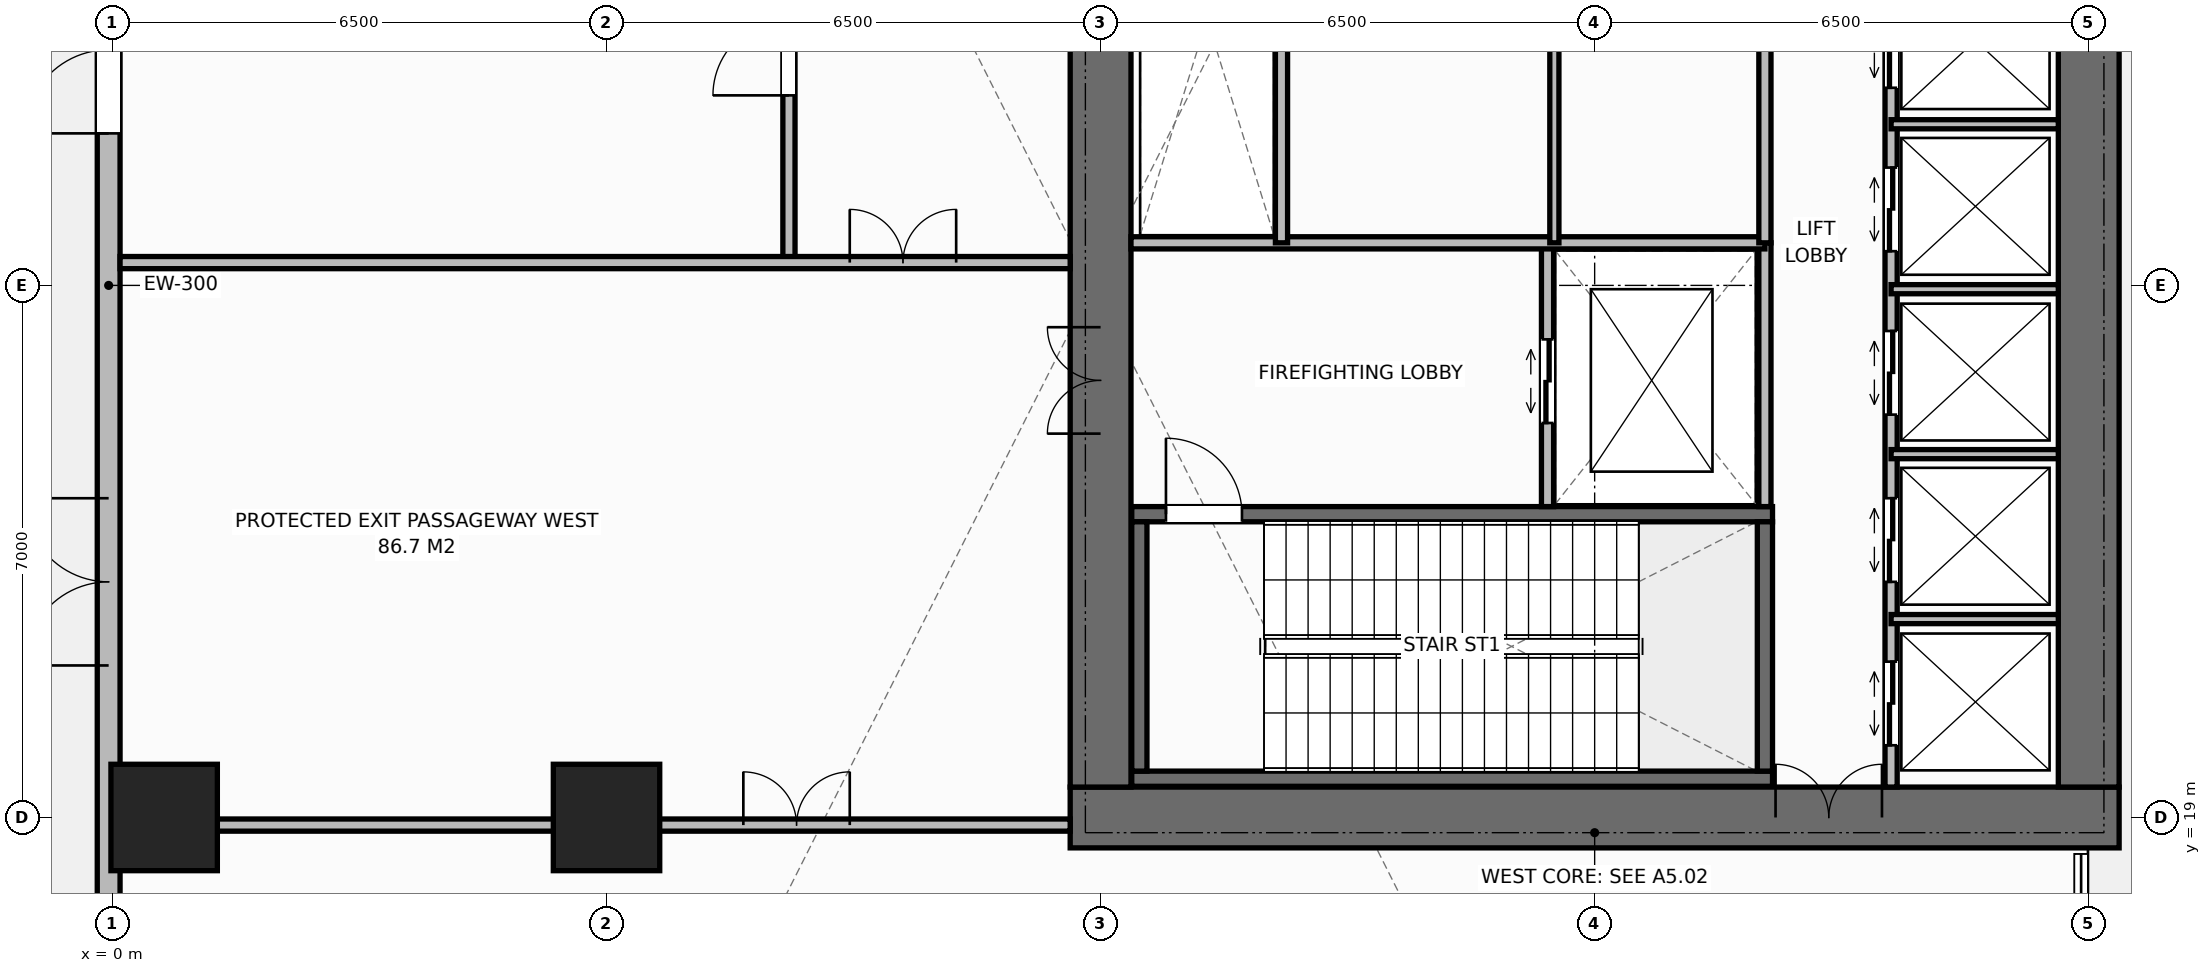
"""IFC4 building model, lengths in metres.
Left out: names, types, materials, properties, quantities, classifications, styles, units other than length and angle.
Written with IfcOpenShell. Run it as: python <this file> out.ifc"""

import sys

from ifc_helpers import new_model, si_unit, direction, frame, frame_2d, origin, origin_2d, place, context, subcontext, project, spatial, rectangle, extrude, element, fill, save


model = new_model("IFC4")
c1 = context("Model", 3, precision=1e-05, world=origin(), true_north=direction((0.0, 1.0)))
c2 = subcontext(c1, "Body", "Model", "MODEL_VIEW")
j1 = project(units=[si_unit("LENGTHUNIT", "METRE"), si_unit("PLANEANGLEUNIT", "RADIAN")], contexts=[c1])
p1 = place(None, origin())
s1 = spatial("IfcSite", under=j1, at=p1, CompositionType="ELEMENT")
p2 = place(p1, origin())
s2 = spatial("IfcBuilding", under=s1, at=p2, CompositionType="ELEMENT")
p3 = place(p2, origin())
s3 = spatial("IfcBuildingStorey", under=s2, at=p3, CompositionType="ELEMENT", Elevation=0.0)
p4 = place(p3, frame((12.6, 19.0, 0.0), z_axis=(0.0, 0.0, 1.0), x_axis=(1.0, 0.0, 0.0)))
e1 = element("IfcWall", 1, at=p4, inside=s3, PredefinedType="SHEAR", context=c2, shape_type="SweptSolid", body=[
    extrude(rectangle(XDim=13.8, YDim=0.8, at=frame_2d((6.9, 0.0))), origin(), (0.0, 0.0, 1.0), 6.0),
])
p5 = place(p4, frame((9.28, 0.0, 0.0)))
e2 = element("IfcOpeningElement", 2, at=p5, cuts=e1, PredefinedType="OPENING", context=c2, shape_type="SweptSolid", body=[
    extrude(rectangle(XDim=1.4, YDim=2.2, at=frame_2d((0.7, 1.1))), frame((0.0, 0.41, 0.0), z_axis=(0.0, -1.0, 0.0), x_axis=(1.0, 0.0, 0.0)), (0.0, 0.0, 1.0), 0.82),
])
p6 = place(p3, frame((13.0, 19.4, 0.0), z_axis=(0.0, 0.0, 1.0), x_axis=(0.0, 1.0, 0.0)))
e3 = element("IfcWall", 3, at=p6, inside=s3, PredefinedType="SHEAR", context=c2, shape_type="SweptSolid", body=[
    extrude(rectangle(XDim=13.2, YDim=0.8, at=frame_2d((6.6, 0.0))), origin(), (0.0, 0.0, 1.0), 6.0),
])
p7 = place(p6, frame((4.65, 0.0, 0.0)))
e4 = element("IfcOpeningElement", 4, at=p7, cuts=e3, PredefinedType="OPENING", context=c2, shape_type="SweptSolid", body=[
    extrude(rectangle(XDim=1.4, YDim=2.2, at=frame_2d((0.7, 1.1))), frame((0.0, 0.41, 0.0), z_axis=(0.0, -1.0, 0.0), x_axis=(1.0, 0.0, 0.0)), (0.0, 0.0, 1.0), 0.82),
])
p8 = place(p3, frame((26.0, 19.4, 0.0), z_axis=(0.0, 0.0, 1.0), x_axis=(0.0, 1.0, 0.0)))
e5 = element("IfcWall", 5, at=p8, inside=s3, PredefinedType="SHEAR", context=c2, shape_type="SweptSolid", body=[
    extrude(rectangle(XDim=13.2, YDim=0.8, at=frame_2d((6.6, 0.0))), origin(), (0.0, 0.0, 1.0), 6.0),
])
p9 = place(p3, frame((13.41, 19.51, 0.0), z_axis=(0.0, 0.0, 1.0), x_axis=(1.0, 0.0, 0.0)))
e6 = element("IfcWall", 6, at=p9, inside=s3, PredefinedType="SHEAR", context=c2, shape_type="SweptSolid", body=[
    extrude(rectangle(XDim=8.43, YDim=0.2, at=frame_2d((4.215, 0.0))), origin(), (0.0, 0.0, 1.0), 6.0),
])
p10 = place(p3, frame((13.41, 22.99, 0.0), z_axis=(0.0, 0.0, 1.0), x_axis=(1.0, 0.0, 0.0)))
e7 = element("IfcWall", 7, at=p10, inside=s3, PredefinedType="SHEAR", context=c2, shape_type="SweptSolid", body=[
    extrude(rectangle(XDim=8.43, YDim=0.2, at=frame_2d((4.215, 0.0))), origin(), (0.0, 0.0, 1.0), 6.0),
])
p11 = place(p10, frame((0.45, 0.0, 0.0)))
e8 = element("IfcOpeningElement", 8, at=p11, cuts=e7, PredefinedType="OPENING", context=c2, shape_type="SweptSolid", body=[
    extrude(rectangle(XDim=1.0, YDim=2.15, at=frame_2d((0.5, 1.075))), frame((0.0, 0.11, 0.0), z_axis=(0.0, -1.0, 0.0), x_axis=(1.0, 0.0, 0.0)), (0.0, 0.0, 1.0), 0.22),
])
for number, where, z_axis, x_axis in (
    (9, (13.51, 19.61, 0.0), (0.0, 0.0, 1.0), (0.0, 1.0, 0.0)),
    (10, (21.74, 19.61, 0.0), (0.0, 0.0, 1.0), (0.0, 1.0, 0.0)),
):
    element("IfcWall", number, at=place(p3, frame(where, z_axis=z_axis, x_axis=x_axis)), inside=s3, PredefinedType="SHEAR", context=c2, shape_type="SweptSolid", body=[
        extrude(rectangle(XDim=3.28, YDim=0.2, at=frame_2d((1.64, 0.0))), origin(), (0.0, 0.0, 1.0), 6.0),
    ])
for number, where, z_axis, x_axis in (
    (11, (6.5, 19.0, 0.0), (0.0, 0.0, 1.0), (1.0, 0.0, 0.0)),
    (12, (0.68, 19.0, 0.0), (0.0, 0.0, 1.0), (1.0, 0.0, 0.0)),
):
    element("IfcColumn", number, at=place(p3, frame(where, z_axis=z_axis, x_axis=x_axis)), inside=s3, PredefinedType="COLUMN", context=c2, shape_type="SweptSolid", body=[
        extrude(rectangle(XDim=1.4, YDim=1.4, at=origin_2d()), origin(), (0.0, 0.0, 1.0), 6.0),
    ])
p12 = place(p3, frame((-0.05, 3.2, 0.0), z_axis=(0.0, 0.0, 1.0), x_axis=(0.0, 1.0, 0.0)))
e13 = element("IfcWall", 13, at=p12, inside=s3, PredefinedType="STANDARD", context=c2, shape_type="SweptSolid", body=[
    extrude(rectangle(XDim=45.6, YDim=0.3, at=frame_2d((22.8, 0.0))), origin(), (0.0, 0.0, 1.0), 5.72),
])
p13 = place(p12, frame((17.8, 0.0, 0.0)))
e14 = element("IfcOpeningElement", 14, at=p13, cuts=e13, PredefinedType="OPENING", context=c2, shape_type="SweptSolid", body=[
    extrude(rectangle(XDim=2.2, YDim=2.4, at=frame_2d((1.1, 1.2))), frame((0.0, 0.16, 0.0), z_axis=(0.0, -1.0, 0.0), x_axis=(1.0, 0.0, 0.0)), (0.0, 0.0, 1.0), 0.32),
])
p14 = place(p12, frame((24.8, 0.0, 0.0)))
e15 = element("IfcOpeningElement", 15, at=p14, cuts=e13, PredefinedType="OPENING", context=c2, shape_type="SweptSolid", body=[
    extrude(rectangle(XDim=1.1, YDim=2.2, at=frame_2d((0.55, 1.1))), frame((0.0, 0.16, 0.0), z_axis=(0.0, -1.0, 0.0), x_axis=(1.0, 0.0, 0.0)), (0.0, 0.0, 1.0), 0.32),
])
p15 = place(p12, frame((4.3, 0.0, 0.9)))
e16 = element("IfcOpeningElement", 16, at=p15, cuts=e13, PredefinedType="OPENING", context=c2, shape_type="SweptSolid", body=[
    extrude(rectangle(XDim=1.8, YDim=2.2, at=frame_2d((0.9, 1.1))), frame((0.0, 0.16, 0.0), z_axis=(0.0, -1.0, 0.0), x_axis=(1.0, 0.0, 0.0)), (0.0, 0.0, 1.0), 0.32),
])
p16 = place(p12, frame((11.3, 0.0, 0.9)))
e17 = element("IfcOpeningElement", 17, at=p16, cuts=e13, PredefinedType="OPENING", context=c2, shape_type="SweptSolid", body=[
    extrude(rectangle(XDim=1.8, YDim=2.2, at=frame_2d((0.9, 1.1))), frame((0.0, 0.16, 0.0), z_axis=(0.0, -1.0, 0.0), x_axis=(1.0, 0.0, 0.0)), (0.0, 0.0, 1.0), 0.32),
])
p17 = place(p12, frame((33.0, 0.0, 0.9)))
e18 = element("IfcOpeningElement", 18, at=p17, cuts=e13, PredefinedType="OPENING", context=c2, shape_type="SweptSolid", body=[
    extrude(rectangle(XDim=1.8, YDim=2.2, at=frame_2d((0.9, 1.1))), frame((0.0, 0.16, 0.0), z_axis=(0.0, -1.0, 0.0), x_axis=(1.0, 0.0, 0.0)), (0.0, 0.0, 1.0), 0.32),
])
p18 = place(p12, frame((39.3, 0.0, 0.9)))
e19 = element("IfcOpeningElement", 19, at=p18, cuts=e13, PredefinedType="OPENING", context=c2, shape_type="SweptSolid", body=[
    extrude(rectangle(XDim=1.8, YDim=2.2, at=frame_2d((0.9, 1.1))), frame((0.0, 0.16, 0.0), z_axis=(0.0, -1.0, 0.0), x_axis=(1.0, 0.0, 0.0)), (0.0, 0.0, 1.0), 0.32),
])
p19 = place(p3, frame((21.74, 23.09, 0.0), z_axis=(0.0, 0.0, 1.0), x_axis=(0.0, 1.0, 0.0)))
e20 = element("IfcWall", 20, at=p19, inside=s3, PredefinedType="STANDARD", context=c2, shape_type="SweptSolid", body=[
    extrude(rectangle(XDim=3.47, YDim=0.16, at=frame_2d((1.735, 0.0))), origin(), (0.0, 0.0, 1.0), 5.72),
])
p20 = place(p3, frame((18.88, 23.09, 0.0), z_axis=(0.0, 0.0, 1.0), x_axis=(0.0, 1.0, 0.0)))
e21 = element("IfcWall", 21, at=p20, inside=s3, PredefinedType="STANDARD", context=c2, shape_type="SweptSolid", body=[
    extrude(rectangle(XDim=3.47, YDim=0.16, at=frame_2d((1.735, 0.0))), origin(), (0.0, 0.0, 1.0), 5.72),
])
p21 = place(p20, frame((1.1, 0.0, 0.0)))
e22 = element("IfcOpeningElement", 22, at=p21, cuts=e21, PredefinedType="OPENING", context=c2, shape_type="SweptSolid", body=[
    extrude(rectangle(XDim=1.1, YDim=2.2, at=frame_2d((0.55, 1.1))), frame((0.0, 0.09, 0.0), z_axis=(0.0, -1.0, 0.0), x_axis=(1.0, 0.0, 0.0)), (0.0, 0.0, 1.0), 0.18),
])
p22 = place(p3, frame((13.4, 26.56, 0.0), z_axis=(0.0, 0.0, 1.0), x_axis=(1.0, 0.0, 0.0)))
e23 = element("IfcWall", 23, at=p22, inside=s3, PredefinedType="STANDARD", context=c2, shape_type="SweptSolid", body=[
    extrude(rectangle(XDim=8.34, YDim=0.16, at=frame_2d((4.17, 0.0))), origin(), (0.0, 0.0, 1.0), 5.72),
])
p23 = place(p3, frame((15.38, 26.56, 0.0), z_axis=(0.0, 0.0, 1.0), x_axis=(0.0, 1.0, 0.0)))
e24 = element("IfcWall", 24, at=p23, inside=s3, PredefinedType="STANDARD", context=c2, shape_type="SweptSolid", body=[
    extrude(rectangle(XDim=6.04, YDim=0.16, at=frame_2d((3.02, 0.0))), origin(), (0.0, 0.0, 1.0), 5.72),
])
p24 = place(p3, frame((18.97, 26.56, 0.0), z_axis=(0.0, 0.0, 1.0), x_axis=(0.0, 1.0, 0.0)))
e25 = element("IfcWall", 25, at=p24, inside=s3, PredefinedType="PARTITIONING", context=c2, shape_type="SweptSolid", body=[
    extrude(rectangle(XDim=6.04, YDim=0.12, at=frame_2d((3.02, 0.0))), origin(), (0.0, 0.0, 1.0), 5.72),
])
p25 = place(p3, frame((21.74, 26.56, 0.0), z_axis=(0.0, 0.0, 1.0), x_axis=(0.0, 1.0, 0.0)))
e26 = element("IfcWall", 26, at=p25, inside=s3, PredefinedType="STANDARD", context=c2, shape_type="SweptSolid", body=[
    extrude(rectangle(XDim=6.04, YDim=0.16, at=frame_2d((3.02, 0.0))), origin(), (0.0, 0.0, 1.0), 5.72),
])
p26 = place(p3, frame((23.4, 19.4, 0.0), z_axis=(0.0, 0.0, 1.0), x_axis=(0.0, 1.0, 0.0)))
e27 = element("IfcWall", 27, at=p26, inside=s3, PredefinedType="STANDARD", context=c2, shape_type="SweptSolid", body=[
    extrude(rectangle(XDim=13.2, YDim=0.16, at=frame_2d((6.6, 0.0))), origin(), (0.0, 0.0, 1.0), 5.72),
])
p27 = place(p26, frame((0.55, 0.0, 0.0)))
e28 = element("IfcOpeningElement", 28, at=p27, cuts=e27, PredefinedType="OPENING", context=c2, shape_type="SweptSolid", body=[
    extrude(rectangle(XDim=1.1, YDim=2.2, at=frame_2d((0.55, 1.1))), frame((0.0, 0.09, 0.0), z_axis=(0.0, -1.0, 0.0), x_axis=(1.0, 0.0, 0.0)), (0.0, 0.0, 1.0), 0.18),
])
p28 = place(p26, frame((2.7, 0.0, 0.0)))
e29 = element("IfcOpeningElement", 29, at=p28, cuts=e27, PredefinedType="OPENING", context=c2, shape_type="SweptSolid", body=[
    extrude(rectangle(XDim=1.1, YDim=2.2, at=frame_2d((0.55, 1.1))), frame((0.0, 0.09, 0.0), z_axis=(0.0, -1.0, 0.0), x_axis=(1.0, 0.0, 0.0)), (0.0, 0.0, 1.0), 0.18),
])
p29 = place(p26, frame((4.9, 0.0, 0.0)))
e30 = element("IfcOpeningElement", 30, at=p29, cuts=e27, PredefinedType="OPENING", context=c2, shape_type="SweptSolid", body=[
    extrude(rectangle(XDim=1.1, YDim=2.2, at=frame_2d((0.55, 1.1))), frame((0.0, 0.09, 0.0), z_axis=(0.0, -1.0, 0.0), x_axis=(1.0, 0.0, 0.0)), (0.0, 0.0, 1.0), 0.18),
])
p30 = place(p26, frame((7.05, 0.0, 0.0)))
e31 = element("IfcOpeningElement", 31, at=p30, cuts=e27, PredefinedType="OPENING", context=c2, shape_type="SweptSolid", body=[
    extrude(rectangle(XDim=1.1, YDim=2.2, at=frame_2d((0.55, 1.1))), frame((0.0, 0.09, 0.0), z_axis=(0.0, -1.0, 0.0), x_axis=(1.0, 0.0, 0.0)), (0.0, 0.0, 1.0), 0.18),
])
p31 = place(p26, frame((9.2, 0.0, 0.0)))
e32 = element("IfcOpeningElement", 32, at=p31, cuts=e27, PredefinedType="OPENING", context=c2, shape_type="SweptSolid", body=[
    extrude(rectangle(XDim=1.1, YDim=2.2, at=frame_2d((0.55, 1.1))), frame((0.0, 0.09, 0.0), z_axis=(0.0, -1.0, 0.0), x_axis=(1.0, 0.0, 0.0)), (0.0, 0.0, 1.0), 0.18),
])
p32 = place(p26, frame((11.4, 0.0, 0.0)))
e33 = element("IfcOpeningElement", 33, at=p32, cuts=e27, PredefinedType="OPENING", context=c2, shape_type="SweptSolid", body=[
    extrude(rectangle(XDim=1.1, YDim=2.2, at=frame_2d((0.55, 1.1))), frame((0.0, 0.09, 0.0), z_axis=(0.0, -1.0, 0.0), x_axis=(1.0, 0.0, 0.0)), (0.0, 0.0, 1.0), 0.18),
])
for number, where, z_axis, x_axis in (
    (34, (23.4, 21.61, 0.0), (0.0, 0.0, 1.0), (1.0, 0.0, 0.0)),
    (35, (23.4, 23.78, 0.0), (0.0, 0.0, 1.0), (1.0, 0.0, 0.0)),
    (36, (23.4, 25.95, 0.0), (0.0, 0.0, 1.0), (1.0, 0.0, 0.0)),
    (37, (23.4, 28.12, 0.0), (0.0, 0.0, 1.0), (1.0, 0.0, 0.0)),
):
    element("IfcWall", number, at=place(p3, frame(where, z_axis=z_axis, x_axis=x_axis)), inside=s3, PredefinedType="PARTITIONING", context=c2, shape_type="SweptSolid", body=[
        extrude(rectangle(XDim=2.2, YDim=0.12, at=frame_2d((1.1, 0.0))), origin(), (0.0, 0.0, 1.0), 5.72),
    ])
p33 = place(p3, frame((0.1, 18.9, 0.0), z_axis=(0.0, 0.0, 1.0), x_axis=(1.0, 0.0, 0.0)))
e38 = element("IfcWall", 38, at=p33, inside=s3, PredefinedType="STANDARD", context=c2, shape_type="SweptSolid", body=[
    extrude(rectangle(XDim=12.5, YDim=0.16, at=frame_2d((6.25, 0.0))), origin(), (0.0, 0.0, 1.0), 4.92),
])
p34 = place(p33, frame((8.2, 0.0, 0.0)))
e39 = element("IfcOpeningElement", 39, at=p34, cuts=e38, PredefinedType="OPENING", context=c2, shape_type="SweptSolid", body=[
    extrude(rectangle(XDim=1.4, YDim=2.2, at=frame_2d((0.7, 1.1))), frame((0.0, 0.09, 0.0), z_axis=(0.0, -1.0, 0.0), x_axis=(1.0, 0.0, 0.0)), (0.0, 0.0, 1.0), 0.18),
])
p35 = place(p3, frame((8.9, 26.3, 0.0), z_axis=(0.0, 0.0, 1.0), x_axis=(0.0, 1.0, 0.0)))
e40 = element("IfcWall", 40, at=p35, inside=s3, PredefinedType="STANDARD", context=c2, shape_type="SweptSolid", body=[
    extrude(rectangle(XDim=9.3, YDim=0.16, at=frame_2d((4.65, 0.0))), origin(), (0.0, 0.0, 1.0), 5.72),
])
p36 = place(p35, frame((2.2, 0.0, 0.0)))
e41 = element("IfcOpeningElement", 41, at=p36, cuts=e40, PredefinedType="OPENING", context=c2, shape_type="SweptSolid", body=[
    extrude(rectangle(XDim=1.0, YDim=2.15, at=frame_2d((0.5, 1.075))), frame((0.0, 0.09, 0.0), z_axis=(0.0, -1.0, 0.0), x_axis=(1.0, 0.0, 0.0)), (0.0, 0.0, 1.0), 0.18),
])
p37 = place(p3, frame((0.1, 26.3, 0.0), z_axis=(0.0, 0.0, 1.0), x_axis=(1.0, 0.0, 0.0)))
e42 = element("IfcWall", 42, at=p37, inside=s3, PredefinedType="STANDARD", context=c2, shape_type="SweptSolid", body=[
    extrude(rectangle(XDim=12.5, YDim=0.16, at=frame_2d((6.25, 0.0))), origin(), (0.0, 0.0, 1.0), 5.72),
])
p38 = place(p37, frame((9.6, 0.0, 0.0)))
e43 = element("IfcOpeningElement", 43, at=p38, cuts=e42, PredefinedType="OPENING", context=c2, shape_type="SweptSolid", body=[
    extrude(rectangle(XDim=1.4, YDim=2.2, at=frame_2d((0.7, 1.1))), frame((0.0, 0.09, 0.0), z_axis=(0.0, -1.0, 0.0), x_axis=(1.0, 0.0, 0.0)), (0.0, 0.0, 1.0), 0.18),
])
p39 = place(p13, origin())
e44 = element("IfcDoor", 44, at=p39, inside=s3, OperationType="DOUBLE_DOOR_SINGLE_SWING", PredefinedType="DOOR", context=c2, shape_type="SweptSolid", body=[
    extrude(rectangle(XDim=2.2, YDim=2.4, at=frame_2d((1.1, 1.2))), frame((0.0, 0.025, 0.0), z_axis=(0.0, -1.0, 0.0), x_axis=(1.0, 0.0, 0.0)), (0.0, 0.0, 1.0), 0.05),
])
fill(e14, e44)
p40 = place(p14, origin())
e45 = element("IfcDoor", 45, at=p40, inside=s3, OperationType="SINGLE_SWING_LEFT", PredefinedType="DOOR", context=c2, shape_type="SweptSolid", body=[
    extrude(rectangle(XDim=1.1, YDim=2.2, at=frame_2d((0.55, 1.1))), frame((0.0, 0.025, 0.0), z_axis=(0.0, -1.0, 0.0), x_axis=(1.0, 0.0, 0.0)), (0.0, 0.0, 1.0), 0.05),
])
fill(e15, e45)
p41 = place(p11, origin())
e46 = element("IfcDoor", 46, at=p41, inside=s3, OperationType="SINGLE_SWING_LEFT", PredefinedType="DOOR", context=c2, shape_type="SweptSolid", body=[
    extrude(rectangle(XDim=1.0, YDim=2.15, at=frame_2d((0.5, 1.075))), frame((0.0, 0.025, 0.0), z_axis=(0.0, -1.0, 0.0), x_axis=(1.0, 0.0, 0.0)), (0.0, 0.0, 1.0), 0.05),
])
fill(e8, e46)
p42 = place(p7, origin())
e47 = element("IfcDoor", 47, at=p42, inside=s3, OperationType="DOUBLE_DOOR_SINGLE_SWING", PredefinedType="DOOR", context=c2, shape_type="SweptSolid", body=[
    extrude(rectangle(XDim=1.4, YDim=2.2, at=frame_2d((0.7, 1.1))), frame((0.0, 0.025, 0.0), z_axis=(0.0, -1.0, 0.0), x_axis=(1.0, 0.0, 0.0)), (0.0, 0.0, 1.0), 0.05),
])
fill(e4, e47)
p43 = place(p21, origin())
e48 = element("IfcDoor", 48, at=p43, inside=s3, OperationType="DOUBLE_DOOR_SLIDING", PredefinedType="DOOR", context=c2, shape_type="SweptSolid", body=[
    extrude(rectangle(XDim=1.1, YDim=2.2, at=frame_2d((0.55, 1.1))), frame((0.0, 0.025, 0.0), z_axis=(0.0, -1.0, 0.0), x_axis=(1.0, 0.0, 0.0)), (0.0, 0.0, 1.0), 0.05),
])
fill(e22, e48)
p44 = place(p5, origin())
e49 = element("IfcDoor", 49, at=p44, inside=s3, OperationType="DOUBLE_DOOR_SINGLE_SWING", PredefinedType="DOOR", context=c2, shape_type="SweptSolid", body=[
    extrude(rectangle(XDim=1.4, YDim=2.2, at=frame_2d((0.7, 1.1))), frame((0.0, 0.125, 0.0), z_axis=(0.0, -1.0, 0.0), x_axis=(1.0, 0.0, 0.0)), (0.0, 0.0, 1.0), 0.05),
])
fill(e2, e49)
p45 = place(p27, origin())
e50 = element("IfcDoor", 50, at=p45, inside=s3, OperationType="DOUBLE_DOOR_SLIDING", PredefinedType="DOOR", context=c2, shape_type="SweptSolid", body=[
    extrude(rectangle(XDim=1.1, YDim=2.2, at=frame_2d((0.55, 1.1))), frame((0.0, 0.025, 0.0), z_axis=(0.0, -1.0, 0.0), x_axis=(1.0, 0.0, 0.0)), (0.0, 0.0, 1.0), 0.05),
])
fill(e28, e50)
p46 = place(p28, origin())
e51 = element("IfcDoor", 51, at=p46, inside=s3, OperationType="DOUBLE_DOOR_SLIDING", PredefinedType="DOOR", context=c2, shape_type="SweptSolid", body=[
    extrude(rectangle(XDim=1.1, YDim=2.2, at=frame_2d((0.55, 1.1))), frame((0.0, 0.025, 0.0), z_axis=(0.0, -1.0, 0.0), x_axis=(1.0, 0.0, 0.0)), (0.0, 0.0, 1.0), 0.05),
])
fill(e29, e51)
p47 = place(p29, origin())
e52 = element("IfcDoor", 52, at=p47, inside=s3, OperationType="DOUBLE_DOOR_SLIDING", PredefinedType="DOOR", context=c2, shape_type="SweptSolid", body=[
    extrude(rectangle(XDim=1.1, YDim=2.2, at=frame_2d((0.55, 1.1))), frame((0.0, 0.025, 0.0), z_axis=(0.0, -1.0, 0.0), x_axis=(1.0, 0.0, 0.0)), (0.0, 0.0, 1.0), 0.05),
])
fill(e30, e52)
p48 = place(p30, origin())
e53 = element("IfcDoor", 53, at=p48, inside=s3, OperationType="DOUBLE_DOOR_SLIDING", PredefinedType="DOOR", context=c2, shape_type="SweptSolid", body=[
    extrude(rectangle(XDim=1.1, YDim=2.2, at=frame_2d((0.55, 1.1))), frame((0.0, 0.025, 0.0), z_axis=(0.0, -1.0, 0.0), x_axis=(1.0, 0.0, 0.0)), (0.0, 0.0, 1.0), 0.05),
])
fill(e31, e53)
p49 = place(p31, origin())
e54 = element("IfcDoor", 54, at=p49, inside=s3, OperationType="DOUBLE_DOOR_SLIDING", PredefinedType="DOOR", context=c2, shape_type="SweptSolid", body=[
    extrude(rectangle(XDim=1.1, YDim=2.2, at=frame_2d((0.55, 1.1))), frame((0.0, 0.025, 0.0), z_axis=(0.0, -1.0, 0.0), x_axis=(1.0, 0.0, 0.0)), (0.0, 0.0, 1.0), 0.05),
])
fill(e32, e54)
p50 = place(p34, origin())
e55 = element("IfcDoor", 55, at=p50, inside=s3, OperationType="DOUBLE_DOOR_SINGLE_SWING", PredefinedType="DOOR", context=c2, shape_type="SweptSolid", body=[
    extrude(rectangle(XDim=1.4, YDim=2.2, at=frame_2d((0.7, 1.1))), frame((0.0, 0.025, 0.0), z_axis=(0.0, -1.0, 0.0), x_axis=(1.0, 0.0, 0.0)), (0.0, 0.0, 1.0), 0.05),
])
fill(e39, e55)
p51 = place(p36, origin())
e56 = element("IfcDoor", 56, at=p51, inside=s3, OperationType="SINGLE_SWING_LEFT", PredefinedType="DOOR", context=c2, shape_type="SweptSolid", body=[
    extrude(rectangle(XDim=1.0, YDim=2.15, at=frame_2d((0.5, 1.075))), frame((0.0, 0.025, 0.0), z_axis=(0.0, -1.0, 0.0), x_axis=(1.0, 0.0, 0.0)), (0.0, 0.0, 1.0), 0.05),
])
fill(e41, e56)
p52 = place(p38, origin())
e57 = element("IfcDoor", 57, at=p52, inside=s3, OperationType="DOUBLE_DOOR_SINGLE_SWING", PredefinedType="DOOR", context=c2, shape_type="SweptSolid", body=[
    extrude(rectangle(XDim=1.4, YDim=2.2, at=frame_2d((0.7, 1.1))), frame((0.0, 0.025, 0.0), z_axis=(0.0, -1.0, 0.0), x_axis=(1.0, 0.0, 0.0)), (0.0, 0.0, 1.0), 0.05),
])
fill(e43, e57)
save(model, sys.argv[1])
